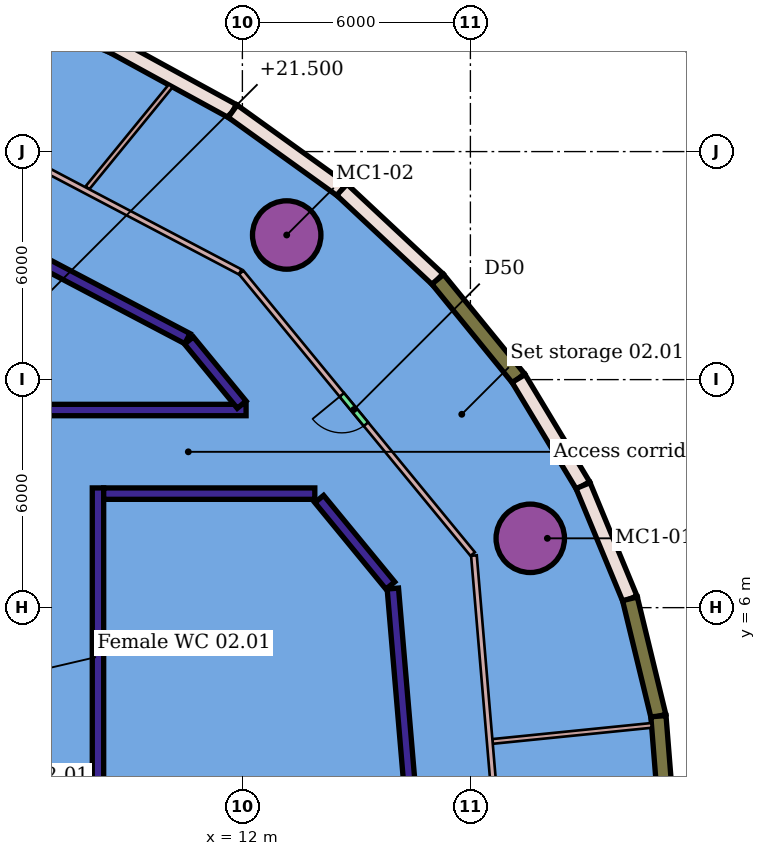
"""IFC4 building model, lengths in metres.
Left out: names, types, materials, properties, quantities, classifications, styles, units other than length and angle.
Written with IfcOpenShell. Run it as: python <this file> out.ifc"""

import sys

from ifc_helpers import new_model, si_unit, direction, frame, frame_2d, origin, origin_2d, place, context, subcontext, project, spatial, rectangle, hollow_circle, extrude, element, fill, save


model = new_model("IFC4")
c1 = context("Model", 3, precision=1e-05, world=origin(), true_north=direction((0.0, 1.0)))
c2 = subcontext(c1, "Body", "Model", "MODEL_VIEW")
j1 = project(units=[si_unit("LENGTHUNIT", "METRE"), si_unit("PLANEANGLEUNIT", "RADIAN")], contexts=[c1])
p1 = place(None, origin())
s1 = spatial("IfcSite", under=j1, at=p1, CompositionType="ELEMENT")
p2 = place(p1, origin())
s2 = spatial("IfcBuilding", under=s1, at=p2, CompositionType="ELEMENT")
p3 = place(p2, frame((0.0, 0.0, 17.0)))
s3 = spatial("IfcBuildingStorey", under=s2, at=p3, CompositionType="ELEMENT", Elevation=17.0)
for number, where, z_axis, x_axis in (
    (1, (19.575, 7.824, 0.0), (0.0, 0.0, 1.0), (1.0, 0.0, 0.0)),
    (2, (13.166, 15.805, 0.0), (0.0, 0.0, 1.0), (1.0, 0.0, 0.0)),
):
    element("IfcColumn", number, at=place(p3, frame(where, z_axis=z_axis, x_axis=x_axis)), inside=s3, PredefinedType="COLUMN", context=c2, shape_type="SweptSolid", body=[
        extrude(hollow_circle(Radius=0.9, WallThickness=0.06, at=origin_2d()), origin(), (0.0, 0.0, 1.0), 8.8),
    ])
p4 = place(p3, frame((-9.25, 11.2, 0.0), z_axis=(0.0, 0.0, 1.0), x_axis=(1.0, 0.0, 0.0)))
e3 = element("IfcWall", 3, at=p4, inside=s3, PredefinedType="PARTITIONING", context=c2, shape_type="SweptSolid", body=[
    extrude(rectangle(XDim=21.348, YDim=0.3, at=frame_2d((10.674, 0.0))), origin(), (0.0, 0.0, 1.0), 8.35),
])
p5 = place(p3, frame((8.2, -13.105, 0.0), z_axis=(0.0, 0.0, 1.0), x_axis=(0.0, 1.0, 0.0)))
e4 = element("IfcWall", 4, at=p5, inside=s3, PredefinedType="PARTITIONING", context=c2, shape_type="SweptSolid", body=[
    extrude(rectangle(XDim=22.255, YDim=0.3, at=frame_2d((11.127, 0.0))), origin(), (0.0, 0.0, 1.0), 8.35),
])
p6 = place(p3, frame((8.35, 9.0, 0.0), z_axis=(0.0, 0.0, 1.0), x_axis=(1.0, 0.0, 0.0)))
e5 = element("IfcWall", 5, at=p6, inside=s3, PredefinedType="PARTITIONING", context=c2, shape_type="SweptSolid", body=[
    extrude(rectangle(XDim=5.556, YDim=0.3, at=frame_2d((2.778, 0.0))), origin(), (0.0, 0.0, 1.0), 8.35),
])
p7 = place(p3, frame((3.348, 16.871, 0.0), z_axis=(0.0, 0.0, 1.0), x_axis=(0.884926027541, -0.46573160273, 0.0)))
e6 = element("IfcWall", 6, at=p7, inside=s3, PredefinedType="PARTITIONING", context=c2, shape_type="SweptSolid", body=[
    extrude(rectangle(XDim=8.142, YDim=0.3, at=frame_2d((4.071, 0.0))), origin(), (0.0, 0.0, 1.0), 8.35),
])
p8 = place(p3, frame((10.593, 13.03, 0.0), z_axis=(0.0, 0.0, 1.0), x_axis=(0.635029890501, -0.772487565058, 0.0)))
e7 = element("IfcWall", 7, at=p8, inside=s3, PredefinedType="PARTITIONING", context=c2, shape_type="SweptSolid", body=[
    extrude(rectangle(XDim=2.186, YDim=0.3, at=frame_2d((1.093, 0.0))), origin(), (0.0, 0.0, 1.0), 8.35),
])
p9 = place(p3, frame((14.022, 8.859, 0.0), z_axis=(0.0, 0.0, 1.0), x_axis=(0.635004353448, -0.7725085573, 0.0)))
e8 = element("IfcWall", 8, at=p9, inside=s3, PredefinedType="PARTITIONING", context=c2, shape_type="SweptSolid", body=[
    extrude(rectangle(XDim=2.947, YDim=0.3, at=frame_2d((1.474, 0.0))), origin(), (0.0, 0.0, 1.0), 8.35),
])
p10 = place(p3, frame((15.959, 6.502, 0.0), z_axis=(0.0, 0.0, 1.0), x_axis=(0.084484314549, -0.996424809303, 0.0)))
e9 = element("IfcWall", 9, at=p10, inside=s3, PredefinedType="PARTITIONING", context=c2, shape_type="SweptSolid", body=[
    extrude(rectangle(XDim=8.369, YDim=0.3, at=frame_2d((4.185, 0.0))), origin(), (0.0, 0.0, 1.0), 8.35),
])
p11 = place(p3, frame((7.924, 17.048, 0.0), z_axis=(0.0, 0.0, 1.0), x_axis=(0.632553618191, 0.774516571878, 0.0)))
e10 = element("IfcWall", 10, at=p11, inside=s3, PredefinedType="PARTITIONING", context=c2, shape_type="SweptSolid", body=[
    extrude(rectangle(XDim=3.46, YDim=0.125, at=frame_2d((1.73, 0.0))), origin(), (0.0, 0.0, 1.0), 8.35),
])
p12 = place(p3, frame((18.584, 2.48, 0.0), z_axis=(0.0, 0.0, 1.0), x_axis=(0.994951140435, 0.100360490962, 0.0)))
e11 = element("IfcWall", 11, at=p12, inside=s3, PredefinedType="PARTITIONING", context=c2, shape_type="SweptSolid", body=[
    extrude(rectangle(XDim=4.204, YDim=0.125, at=frame_2d((2.102, 0.0))), origin(), (0.0, 0.0, 1.0), 8.35),
])
p13 = place(p3, frame((18.093, 7.371, 0.0), z_axis=(0.0, 0.0, 1.0), x_axis=(0.084469905026, -0.996426030945, 0.0)))
e12 = element("IfcWall", 12, at=p13, inside=s3, PredefinedType="PARTITIONING", context=c2, shape_type="SweptSolid", body=[
    extrude(rectangle(XDim=9.801, YDim=0.15, at=frame_2d((4.9, 0.0))), origin(), (0.0, 0.0, 1.0), 8.35),
])
p14 = place(p3, frame((18.06, 7.411, 0.0), z_axis=(0.0, 0.0, 1.0), x_axis=(-0.63502168635, 0.772494309277, 0.0)))
e13 = element("IfcWall", 13, at=p14, inside=s3, PredefinedType="PARTITIONING", context=c2, shape_type="SweptSolid", body=[
    extrude(rectangle(XDim=9.59, YDim=0.15, at=frame_2d((4.795, 0.0))), origin(), (0.0, 0.0, 1.0), 8.35),
])
p15 = place(p14, frame((4.422, 0.0, 0.0)))
e14 = element("IfcOpeningElement", 14, at=p15, cuts=e13, PredefinedType="OPENING", context=c2, shape_type="SweptSolid", body=[
    extrude(rectangle(XDim=1.0, YDim=2.1, at=frame_2d((0.5, 1.05))), frame((0.0, 0.085, 0.0), z_axis=(0.0, -1.0, 0.0), x_axis=(1.0, 0.0, 0.0)), (0.0, 0.0, 1.0), 0.17),
])
p16 = place(p3, frame((4.083, 18.97, 0.0), z_axis=(0.0, 0.0, 1.0), x_axis=(0.884920607371, -0.465741901326, 0.0)))
e15 = element("IfcWall", 15, at=p16, inside=s3, PredefinedType="PARTITIONING", context=c2, shape_type="SweptSolid", body=[
    extrude(rectangle(XDim=8.882, YDim=0.15, at=frame_2d((4.441, 0.0))), origin(), (0.0, 0.0, 1.0), 8.35),
])
p17 = place(p3, frame((7.925, 21.061, 0.0), z_axis=(0.0, 0.0, 1.0), x_axis=(0.927141159757, -0.374712249444, 0.0)))
e16 = element("IfcWall", 16, at=p17, inside=s3, PredefinedType="SOLIDWALL", context=c2, shape_type="SweptSolid", body=[
    extrude(rectangle(XDim=0.697, YDim=0.4, at=frame_2d((0.348, 0.0))), origin(), (0.0, 0.0, 1.0), 8.4),
])
p18 = place(p3, frame((8.571, 20.8, 0.0), z_axis=(0.0, 0.0, 1.0), x_axis=(0.87711318505, -0.48028372928, 0.0)))
e17 = element("IfcWall", 17, at=p18, inside=s3, PredefinedType="SOLIDWALL", context=c2, shape_type="SweptSolid", body=[
    extrude(rectangle(XDim=3.619, YDim=0.4, at=frame_2d((1.809, 0.0))), origin(), (0.0, 0.0, 1.0), 8.4),
])
p19 = place(p3, frame((11.745, 19.062, 0.0), z_axis=(0.0, 0.0, 1.0), x_axis=(0.81205624831, -0.583579171648, 0.0)))
e18 = element("IfcWall", 18, at=p19, inside=s3, PredefinedType="SOLIDWALL", context=c2, shape_type="SweptSolid", body=[
    extrude(rectangle(XDim=3.538, YDim=0.4, at=frame_2d((1.769, 0.0))), origin(), (0.0, 0.0, 1.0), 8.4),
])
p20 = place(p3, frame((14.618, 16.997, 0.0), z_axis=(0.0, 0.0, 1.0), x_axis=(0.730641209912, -0.682761614605, 0.0)))
e19 = element("IfcWall", 19, at=p20, inside=s3, PredefinedType="SOLIDWALL", context=c2, shape_type="SweptSolid", body=[
    extrude(rectangle(XDim=3.452, YDim=0.4, at=frame_2d((1.726, 0.0))), origin(), (0.0, 0.0, 1.0), 8.4),
])
p21 = place(p3, frame((17.14, 14.64, 0.0), z_axis=(0.0, 0.0, 1.0), x_axis=(0.631953724698, -0.775006122453, 0.0)))
e20 = element("IfcWall", 20, at=p21, inside=s3, PredefinedType="SOLIDWALL", context=c2, shape_type="SweptSolid", body=[
    extrude(rectangle(XDim=3.367, YDim=0.4, at=frame_2d((1.684, 0.0))), origin(), (0.0, 0.0, 1.0), 8.8),
])
p22 = place(p3, frame((19.268, 12.03, 0.0), z_axis=(0.0, 0.0, 1.0), x_axis=(0.515586767828, -0.856837373625, 0.0)))
e21 = element("IfcWall", 21, at=p22, inside=s3, PredefinedType="SOLIDWALL", context=c2, shape_type="SweptSolid", body=[
    extrude(rectangle(XDim=3.29, YDim=0.4, at=frame_2d((1.645, 0.0))), origin(), (0.0, 0.0, 1.0), 8.4),
])
p23 = place(p3, frame((20.964, 9.212, 0.0), z_axis=(0.0, 0.0, 1.0), x_axis=(0.382706172342, -0.923870112976, 0.0)))
e22 = element("IfcWall", 22, at=p23, inside=s3, PredefinedType="SOLIDWALL", context=c2, shape_type="SweptSolid", body=[
    extrude(rectangle(XDim=3.225, YDim=0.4, at=frame_2d((1.612, 0.0))), origin(), (0.0, 0.0, 1.0), 8.4),
])
p24 = place(p3, frame((22.198, 6.232, 0.0), z_axis=(0.0, 0.0, 1.0), x_axis=(0.235896812421, -0.97177810939, 0.0)))
e23 = element("IfcWall", 23, at=p24, inside=s3, PredefinedType="SOLIDWALL", context=c2, shape_type="SweptSolid", body=[
    extrude(rectangle(XDim=3.178, YDim=0.4, at=frame_2d((1.589, 0.0))), origin(), (0.0, 0.0, 1.0), 8.8),
])
p25 = place(p3, frame((22.948, 3.144, 0.0), z_axis=(0.0, 0.0, 1.0), x_axis=(0.079732915346, -0.996816263015, 0.0)))
e24 = element("IfcWall", 24, at=p25, inside=s3, PredefinedType="SOLIDWALL", context=c2, shape_type="SweptSolid", body=[
    extrude(rectangle(XDim=3.154, YDim=0.4, at=frame_2d((1.577, 0.0))), origin(), (0.0, 0.0, 1.0), 8.8),
])
p26 = place(p15, origin())
e25 = element("IfcDoor", 25, at=p26, inside=s3, OperationType="SINGLE_SWING_RIGHT", PredefinedType="DOOR", context=c2, shape_type="SweptSolid", body=[
    extrude(rectangle(XDim=1.0, YDim=2.1, at=frame_2d((0.5, 1.05))), frame((0.0, 0.025, 0.0), z_axis=(0.0, -1.0, 0.0), x_axis=(1.0, 0.0, 0.0)), (0.0, 0.0, 1.0), 0.05),
])
fill(e14, e25)
save(model, sys.argv[1])
